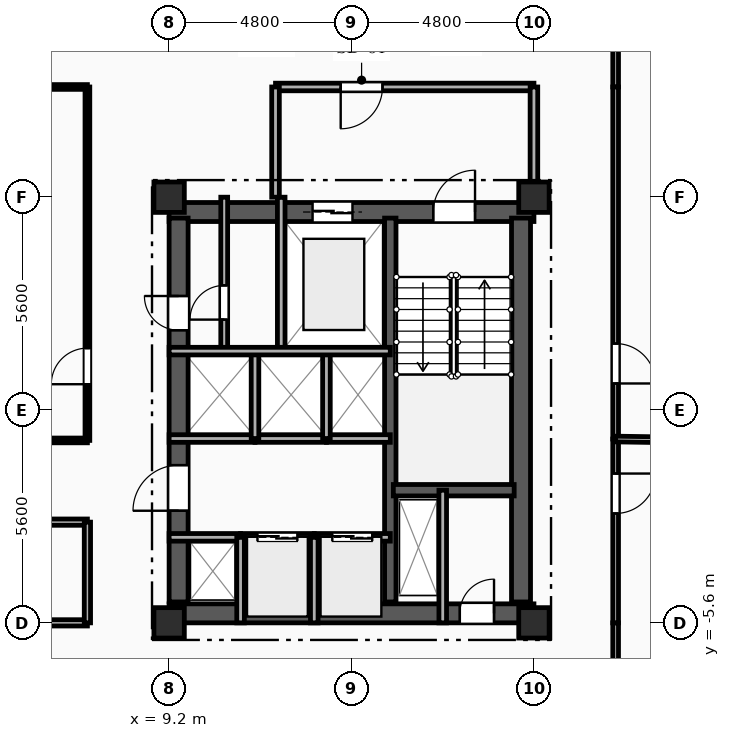
"""IFC4 building model, lengths in metres.
Left out: names, types, materials, properties, quantities, classifications, styles, units other than length and angle.
Written with IfcOpenShell. Run it as: python <this file> out.ifc"""

import sys

from ifc_helpers import new_model, si_unit, direction, frame, frame_2d, origin, origin_2d, place, context, subcontext, project, spatial, rectangle, extrude, element, fill, save


model = new_model("IFC4")
c1 = context("Model", 3, precision=1e-05, world=origin(), true_north=direction((0.0, 1.0)))
c2 = subcontext(c1, "Body", "Model", "MODEL_VIEW")
j1 = project(units=[si_unit("LENGTHUNIT", "METRE"), si_unit("PLANEANGLEUNIT", "RADIAN")], contexts=[c1])
p1 = place(None, origin())
s1 = spatial("IfcSite", under=j1, at=p1, CompositionType="ELEMENT")
p2 = place(p1, origin())
s2 = spatial("IfcBuilding", under=s1, at=p2, CompositionType="ELEMENT")
p3 = place(p2, frame((0.0, 0.0, 179.65)))
s3 = spatial("IfcBuildingStorey", under=s2, at=p3, CompositionType="ELEMENT", Elevation=179.65)
for number, where, z_axis, x_axis in (
    (1, (9.2, -5.6, 0.0), (0.0, 0.0, 1.0), (1.0, 0.0, 0.0)),
    (2, (9.2, 5.6, 0.0), (0.0, 0.0, 1.0), (1.0, 0.0, 0.0)),
    (3, (18.8, -5.6, 0.0), (0.0, 0.0, 1.0), (1.0, 0.0, 0.0)),
    (4, (18.8, 5.6, 0.0), (0.0, 0.0, 1.0), (1.0, 0.0, 0.0)),
):
    element("IfcColumn", number, at=place(p3, frame(where, z_axis=z_axis, x_axis=x_axis)), inside=s3, PredefinedType="COLUMN", context=c2, shape_type="SweptSolid", body=[
        extrude(rectangle(XDim=0.8, YDim=0.8, at=origin_2d()), origin(), (0.0, 0.0, 1.0), 3.35),
    ])
p4 = place(p3, frame((9.2, 5.21, 0.0), z_axis=(0.0, 0.0, 1.0), x_axis=(1.0, 0.0, 0.0)))
e5 = element("IfcWall", 5, at=p4, inside=s3, PredefinedType="SHEAR", context=c2, shape_type="SweptSolid", body=[
    extrude(rectangle(XDim=9.6, YDim=0.5, at=frame_2d((4.8, 0.0))), origin(), (0.0, 0.0, 1.0), 3.04),
])
p5 = place(p4, frame((6.95, 0.0, 0.0)))
e6 = element("IfcOpeningElement", 6, at=p5, cuts=e5, PredefinedType="OPENING", context=c2, shape_type="SweptSolid", body=[
    extrude(rectangle(XDim=1.1, YDim=2.15, at=frame_2d((0.55, 1.075))), frame((0.0, 0.26, 0.0), z_axis=(0.0, -1.0, 0.0), x_axis=(1.0, 0.0, 0.0)), (0.0, 0.0, 1.0), 0.52),
])
p6 = place(p4, frame((3.775, 0.0, 0.0)))
e7 = element("IfcOpeningElement", 7, at=p6, cuts=e5, PredefinedType="OPENING", context=c2, shape_type="SweptSolid", body=[
    extrude(rectangle(XDim=1.05, YDim=2.1, at=frame_2d((0.525, 1.05))), frame((0.0, 0.26, 0.0), z_axis=(0.0, -1.0, 0.0), x_axis=(1.0, 0.0, 0.0)), (0.0, 0.0, 1.0), 0.52),
])
p7 = place(p3, frame((9.2, -5.35, 0.0), z_axis=(0.0, 0.0, 1.0), x_axis=(1.0, 0.0, 0.0)))
e8 = element("IfcWall", 8, at=p7, inside=s3, PredefinedType="SHEAR", context=c2, shape_type="SweptSolid", body=[
    extrude(rectangle(XDim=9.6, YDim=0.5, at=frame_2d((4.8, 0.0))), origin(), (0.0, 0.0, 1.0), 3.04),
])
p8 = place(p7, frame((7.65, 0.0, 0.0)))
e9 = element("IfcOpeningElement", 9, at=p8, cuts=e8, PredefinedType="OPENING", context=c2, shape_type="SweptSolid", body=[
    extrude(rectangle(XDim=0.9, YDim=2.1, at=frame_2d((0.45, 1.05))), frame((0.0, 0.26, 0.0), z_axis=(0.0, -1.0, 0.0), x_axis=(1.0, 0.0, 0.0)), (0.0, 0.0, 1.0), 0.52),
])
p9 = place(p3, frame((9.45, -5.05, 0.0), z_axis=(0.0, 0.0, 1.0), x_axis=(0.0, 1.0, 0.0)))
e10 = element("IfcWall", 10, at=p9, inside=s3, PredefinedType="SHEAR", context=c2, shape_type="SweptSolid", body=[
    extrude(rectangle(XDim=10.1, YDim=0.5, at=frame_2d((5.05, 0.0))), origin(), (0.0, 0.0, 1.0), 3.04),
])
p10 = place(p9, frame((7.15, 0.0, 0.0)))
e11 = element("IfcOpeningElement", 11, at=p10, cuts=e10, PredefinedType="OPENING", context=c2, shape_type="SweptSolid", body=[
    extrude(rectangle(XDim=0.9, YDim=2.1, at=frame_2d((0.45, 1.05))), frame((0.0, 0.26, 0.0), z_axis=(0.0, -1.0, 0.0), x_axis=(1.0, 0.0, 0.0)), (0.0, 0.0, 1.0), 0.52),
])
p11 = place(p9, frame((2.4, 0.0, 0.0)))
e12 = element("IfcOpeningElement", 12, at=p11, cuts=e10, PredefinedType="OPENING", context=c2, shape_type="SweptSolid", body=[
    extrude(rectangle(XDim=1.2, YDim=2.15, at=frame_2d((0.6, 1.075))), frame((0.0, 0.26, 0.0), z_axis=(0.0, -1.0, 0.0), x_axis=(1.0, 0.0, 0.0)), (0.0, 0.0, 1.0), 0.52),
])
p12 = place(p3, frame((18.46, -5.05, 0.0), z_axis=(0.0, 0.0, 1.0), x_axis=(0.0, 1.0, 0.0)))
e13 = element("IfcWall", 13, at=p12, inside=s3, PredefinedType="SHEAR", context=c2, shape_type="SweptSolid", body=[
    extrude(rectangle(XDim=10.1, YDim=0.5, at=frame_2d((5.05, 0.0))), origin(), (0.0, 0.0, 1.0), 3.04),
])
p13 = place(p3, frame((15.02, -5.05, 0.0), z_axis=(0.0, 0.0, 1.0), x_axis=(0.0, 1.0, 0.0)))
e14 = element("IfcWall", 14, at=p13, inside=s3, PredefinedType="SHEAR", context=c2, shape_type="SweptSolid", body=[
    extrude(rectangle(XDim=10.1, YDim=0.3, at=frame_2d((5.05, 0.0))), origin(), (0.0, 0.0, 1.0), 3.04),
])
p14 = place(p3, frame((15.1, -2.11, 0.0), z_axis=(0.0, 0.0, 1.0), x_axis=(1.0, 0.0, 0.0)))
e15 = element("IfcWall", 15, at=p14, inside=s3, PredefinedType="SHEAR", context=c2, shape_type="SweptSolid", body=[
    extrude(rectangle(XDim=3.18, YDim=0.3, at=frame_2d((1.59, 0.0))), origin(), (0.0, 0.0, 1.0), 3.04),
])
p15 = place(p3, frame((16.4, -2.11, 0.0), z_axis=(0.0, 0.0, 1.0), x_axis=(0.0, -1.0, 0.0)))
e16 = element("IfcWall", 16, at=p15, inside=s3, PredefinedType="PARTITIONING", context=c2, shape_type="SweptSolid", body=[
    extrude(rectangle(XDim=3.49, YDim=0.2, at=frame_2d((1.745, 0.0))), origin(), (0.0, 0.0, 1.0), 3.04),
])
p16 = place(p3, frame((12.15, 5.6, 0.0), z_axis=(0.0, 0.0, 1.0), x_axis=(0.0, -1.0, 0.0)))
e17 = element("IfcWall", 17, at=p16, inside=s3, PredefinedType="PARTITIONING", context=c2, shape_type="SweptSolid", body=[
    extrude(rectangle(XDim=4.05, YDim=0.2, at=frame_2d((2.025, 0.0))), origin(), (0.0, 0.0, 1.0), 3.04),
])
p17 = place(p3, frame((18.8, 8.5, 0.0), z_axis=(0.0, 0.0, 1.0), x_axis=(-1.0, 0.0, 0.0)))
e18 = element("IfcWall", 18, at=p17, inside=s3, PredefinedType="PARTITIONING", context=c2, shape_type="SweptSolid", body=[
    extrude(rectangle(XDim=6.8, YDim=0.2, at=frame_2d((3.4, 0.0))), origin(), (0.0, 0.0, 1.0), 3.04),
])
p18 = place(p17, frame((3.985, 0.0, 0.0)))
e19 = element("IfcOpeningElement", 19, at=p18, cuts=e18, PredefinedType="OPENING", context=c2, shape_type="SweptSolid", body=[
    extrude(rectangle(XDim=1.1, YDim=2.15, at=frame_2d((0.55, 1.075))), frame((0.0, 0.11, 0.0), z_axis=(0.0, -1.0, 0.0), x_axis=(1.0, 0.0, 0.0)), (0.0, 0.0, 1.0), 0.22),
])
p19 = place(p3, frame((18.8, 5.6, 0.0), z_axis=(0.0, 0.0, 1.0), x_axis=(0.0, 1.0, 0.0)))
e20 = element("IfcWall", 20, at=p19, inside=s3, PredefinedType="PARTITIONING", context=c2, shape_type="SweptSolid", body=[
    extrude(rectangle(XDim=2.9, YDim=0.2, at=frame_2d((1.45, 0.0))), origin(), (0.0, 0.0, 1.0), 2.665),
])
p20 = place(p3, frame((12.0, 8.5, 0.0), z_axis=(0.0, 0.0, 1.0), x_axis=(0.0, -1.0, 0.0)))
e21 = element("IfcWall", 21, at=p20, inside=s3, PredefinedType="PARTITIONING", context=c2, shape_type="SweptSolid", body=[
    extrude(rectangle(XDim=2.9, YDim=0.2, at=frame_2d((1.45, 0.0))), origin(), (0.0, 0.0, 1.0), 3.04),
])
p21 = place(p3, frame((10.65, 1.55, 0.0), z_axis=(0.0, 0.0, 1.0), x_axis=(0.0, 1.0, 0.0)))
e22 = element("IfcWall", 22, at=p21, inside=s3, PredefinedType="PARTITIONING", context=c2, shape_type="SweptSolid", body=[
    extrude(rectangle(XDim=4.05, YDim=0.18, at=frame_2d((2.025, 0.0))), origin(), (0.0, 0.0, 1.0), 3.04),
])
p22 = place(p21, frame((0.829, 0.0, 0.0)))
e23 = element("IfcOpeningElement", 23, at=p22, cuts=e22, PredefinedType="OPENING", context=c2, shape_type="SweptSolid", body=[
    extrude(rectangle(XDim=0.9, YDim=2.1, at=frame_2d((0.45, 1.05))), frame((0.0, 0.1, 0.0), z_axis=(0.0, -1.0, 0.0), x_axis=(1.0, 0.0, 0.0)), (0.0, 0.0, 1.0), 0.2),
])
p23 = place(p3, frame((9.2, -3.35, 0.0), z_axis=(0.0, 0.0, 1.0), x_axis=(1.0, 0.0, 0.0)))
e24 = element("IfcWall", 24, at=p23, inside=s3, PredefinedType="PARTITIONING", context=c2, shape_type="SweptSolid", body=[
    extrude(rectangle(XDim=1.88, YDim=0.2, at=frame_2d((0.94, 0.0))), origin(), (0.0, 0.0, 1.0), 2.755),
])
p24 = place(p3, frame((11.08, -3.35, 0.0), z_axis=(0.0, 0.0, 1.0), x_axis=(1.0, 0.0, 0.0)))
e25 = element("IfcWall", 25, at=p24, inside=s3, PredefinedType="PARTITIONING", context=c2, shape_type="SweptSolid", body=[
    extrude(rectangle(XDim=1.94, YDim=0.2, at=frame_2d((0.97, 0.0))), origin(), (0.0, 0.0, 1.0), 3.04),
])
p25 = place(p24, frame((0.445, 0.0, 0.0)))
e26 = element("IfcOpeningElement", 26, at=p25, cuts=e25, PredefinedType="OPENING", context=c2, shape_type="SweptSolid", body=[
    extrude(rectangle(XDim=1.05, YDim=2.1, at=frame_2d((0.525, 1.05))), frame((0.0, 0.11, 0.0), z_axis=(0.0, -1.0, 0.0), x_axis=(1.0, 0.0, 0.0)), (0.0, 0.0, 1.0), 0.22),
])
p26 = place(p3, frame((13.02, -3.35, 0.0), z_axis=(0.0, 0.0, 1.0), x_axis=(1.0, 0.0, 0.0)))
e27 = element("IfcWall", 27, at=p26, inside=s3, PredefinedType="PARTITIONING", context=c2, shape_type="SweptSolid", body=[
    extrude(rectangle(XDim=2.0, YDim=0.2, at=frame_2d((1.0, 0.0))), origin(), (0.0, 0.0, 1.0), 3.04),
])
p27 = place(p26, frame((0.475, 0.0, 0.0)))
e28 = element("IfcOpeningElement", 28, at=p27, cuts=e27, PredefinedType="OPENING", context=c2, shape_type="SweptSolid", body=[
    extrude(rectangle(XDim=1.05, YDim=2.1, at=frame_2d((0.525, 1.05))), frame((0.0, 0.11, 0.0), z_axis=(0.0, -1.0, 0.0), x_axis=(1.0, 0.0, 0.0)), (0.0, 0.0, 1.0), 0.22),
])
p28 = place(p3, frame((11.46, -0.75, 0.0), z_axis=(0.0, 0.0, 1.0), x_axis=(-1.0, 0.0, 0.0)))
e29 = element("IfcWall", 29, at=p28, inside=s3, PredefinedType="PARTITIONING", context=c2, shape_type="SweptSolid", body=[
    extrude(rectangle(XDim=2.26, YDim=0.2, at=frame_2d((1.13, 0.0))), origin(), (0.0, 0.0, 1.0), 3.04),
])
p29 = place(p3, frame((13.34, -0.75, 0.0), z_axis=(0.0, 0.0, 1.0), x_axis=(-1.0, 0.0, 0.0)))
e30 = element("IfcWall", 30, at=p29, inside=s3, PredefinedType="PARTITIONING", context=c2, shape_type="SweptSolid", body=[
    extrude(rectangle(XDim=1.88, YDim=0.2, at=frame_2d((0.94, 0.0))), origin(), (0.0, 0.0, 1.0), 3.04),
])
p30 = place(p3, frame((15.02, -0.75, 0.0), z_axis=(0.0, 0.0, 1.0), x_axis=(-1.0, 0.0, 0.0)))
e31 = element("IfcWall", 31, at=p30, inside=s3, PredefinedType="PARTITIONING", context=c2, shape_type="SweptSolid", body=[
    extrude(rectangle(XDim=1.68, YDim=0.2, at=frame_2d((0.84, 0.0))), origin(), (0.0, 0.0, 1.0), 3.04),
])
for number, where, z_axis, x_axis in (
    (32, (11.08, -5.6, 0.0), (0.0, 0.0, 1.0), (0.0, 1.0, 0.0)),
    (33, (13.02, -5.6, 0.0), (0.0, 0.0, 1.0), (0.0, 1.0, 0.0)),
):
    element("IfcWall", number, at=place(p3, frame(where, z_axis=z_axis, x_axis=x_axis)), inside=s3, PredefinedType="PARTITIONING", context=c2, shape_type="SweptSolid", body=[
        extrude(rectangle(XDim=2.25, YDim=0.2, at=frame_2d((1.125, 0.0))), origin(), (0.0, 0.0, 1.0), 3.04),
    ])
for number, where, z_axis, x_axis in (
    (34, (11.46, -0.75, 0.0), (0.0, 0.0, 1.0), (0.0, 1.0, 0.0)),
    (35, (13.34, -0.75, 0.0), (0.0, 0.0, 1.0), (0.0, 1.0, 0.0)),
):
    element("IfcWall", number, at=place(p3, frame(where, z_axis=z_axis, x_axis=x_axis)), inside=s3, PredefinedType="PARTITIONING", context=c2, shape_type="SweptSolid", body=[
        extrude(rectangle(XDim=2.3, YDim=0.2, at=frame_2d((1.15, 0.0))), origin(), (0.0, 0.0, 1.0), 3.04),
    ])
p31 = place(p3, frame((20.95, 10.65, 0.0), z_axis=(0.0, 0.0, 1.0), x_axis=(0.0, -1.0, 0.0)))
e36 = element("IfcWall", 36, at=p31, inside=s3, PredefinedType="PARTITIONING", context=c2, shape_type="SweptSolid", body=[
    extrude(rectangle(XDim=2.15, YDim=0.15, at=frame_2d((1.075, 0.0))), origin(), (0.0, 0.0, 1.0), 3.04),
])
p32 = place(p3, frame((7.05, 8.5, 0.0), z_axis=(0.0, 0.0, 1.0), x_axis=(-1.0, 0.0, 0.0)))
e37 = element("IfcWall", 37, at=p32, inside=s3, PredefinedType="PARTITIONING", context=c2, shape_type="SweptSolid", body=[
    extrude(rectangle(XDim=7.05, YDim=0.125, at=frame_2d((3.525, 0.0))), origin(), (0.0, 0.0, 1.0), 3.04),
])
p33 = place(p3, frame((20.95, -5.6, 0.0), z_axis=(0.0, 0.0, 1.0), x_axis=(0.0, -1.0, 0.0)))
e38 = element("IfcWall", 38, at=p33, inside=s3, PredefinedType="PARTITIONING", context=c2, shape_type="SweptSolid", body=[
    extrude(rectangle(XDim=2.15, YDim=0.15, at=frame_2d((1.075, 0.0))), origin(), (0.0, 0.0, 1.0), 3.04),
])
p34 = place(p3, frame((0.0, -5.6, 0.0), z_axis=(0.0, 0.0, 1.0), x_axis=(1.0, 0.0, 0.0)))
e39 = element("IfcWall", 39, at=p34, inside=s3, PredefinedType="PARTITIONING", context=c2, shape_type="SweptSolid", body=[
    extrude(rectangle(XDim=7.05, YDim=0.165, at=frame_2d((3.525, 0.0))), origin(), (0.0, 0.0, 1.0), 2.525),
])
p35 = place(p3, frame((20.95, -0.763, 0.0), z_axis=(0.0, 0.0, 1.0), x_axis=(0.0, -1.0, 0.0)))
e40 = element("IfcWall", 40, at=p35, inside=s3, PredefinedType="PARTITIONING", context=c2, shape_type="SweptSolid", body=[
    extrude(rectangle(XDim=4.837, YDim=0.15, at=frame_2d((2.418, 0.0))), origin(), (0.0, 0.0, 1.0), 2.695),
])
p36 = place(p35, frame((0.908, 0.0, 0.0)))
e41 = element("IfcOpeningElement", 41, at=p36, cuts=e40, PredefinedType="OPENING", context=c2, shape_type="SweptSolid", body=[
    extrude(rectangle(XDim=1.05, YDim=2.15, at=frame_2d((0.525, 1.075))), frame((0.0, 0.085, 0.0), z_axis=(0.0, -1.0, 0.0), x_axis=(1.0, 0.0, 0.0)), (0.0, 0.0, 1.0), 0.17),
])
p37 = place(p3, frame((20.95, 8.5, 0.0), z_axis=(0.0, 0.0, 1.0), x_axis=(0.0, -1.0, 0.0)))
e42 = element("IfcWall", 42, at=p37, inside=s3, PredefinedType="PARTITIONING", context=c2, shape_type="SweptSolid", body=[
    extrude(rectangle(XDim=9.263, YDim=0.15, at=frame_2d((4.632, 0.0))), origin(), (0.0, 0.0, 1.0), 2.695),
])
p38 = place(p37, frame((6.751, 0.0, 0.0)))
e43 = element("IfcOpeningElement", 43, at=p38, cuts=e42, PredefinedType="OPENING", context=c2, shape_type="SweptSolid", body=[
    extrude(rectangle(XDim=1.05, YDim=2.15, at=frame_2d((0.525, 1.075))), frame((0.0, 0.085, 0.0), z_axis=(0.0, -1.0, 0.0), x_axis=(1.0, 0.0, 0.0)), (0.0, 0.0, 1.0), 0.17),
])
p39 = place(p3, frame((0.0, -0.8, 0.0), z_axis=(0.0, 0.0, 1.0), x_axis=(1.0, 0.0, 0.0)))
e44 = element("IfcWall", 44, at=p39, inside=s3, PredefinedType="PARTITIONING", context=c2, shape_type="SweptSolid", body=[
    extrude(rectangle(XDim=7.05, YDim=0.125, at=frame_2d((3.525, 0.0))), origin(), (0.0, 0.0, 1.0), 3.04),
])
p40 = place(p3, frame((7.05, -2.95, 0.0), z_axis=(0.0, 0.0, 1.0), x_axis=(-1.0, 0.0, 0.0)))
e45 = element("IfcWall", 45, at=p40, inside=s3, PredefinedType="PARTITIONING", context=c2, shape_type="SweptSolid", body=[
    extrude(rectangle(XDim=14.1, YDim=0.165, at=frame_2d((7.05, 0.0))), origin(), (0.0, 0.0, 1.0), 3.04),
])
p41 = place(p40, frame((6.475, 0.0, 0.0)))
e46 = element("IfcOpeningElement", 46, at=p41, cuts=e45, PredefinedType="OPENING", context=c2, shape_type="SweptSolid", body=[
    extrude(rectangle(XDim=1.15, YDim=2.15, at=frame_2d((0.575, 1.075))), frame((0.0, 0.093, 0.0), z_axis=(0.0, -1.0, 0.0), x_axis=(1.0, 0.0, 0.0)), (0.0, 0.0, 1.0), 0.185),
])
p42 = place(p3, frame((7.05, -0.8, 0.0), z_axis=(0.0, 0.0, 1.0), x_axis=(0.0, 1.0, 0.0)))
e47 = element("IfcWall", 47, at=p42, inside=s3, PredefinedType="PARTITIONING", context=c2, shape_type="SweptSolid", body=[
    extrude(rectangle(XDim=9.3, YDim=0.125, at=frame_2d((4.65, 0.0))), origin(), (0.0, 0.0, 1.0), 3.04),
])
p43 = place(p42, frame((1.479, 0.0, 0.0)))
e48 = element("IfcOpeningElement", 48, at=p43, cuts=e47, PredefinedType="OPENING", context=c2, shape_type="SweptSolid", body=[
    extrude(rectangle(XDim=0.95, YDim=2.1, at=frame_2d((0.475, 1.05))), frame((0.0, 0.073, 0.0), z_axis=(0.0, -1.0, 0.0), x_axis=(1.0, 0.0, 0.0)), (0.0, 0.0, 1.0), 0.145),
])
p44 = place(p3, frame((7.05, -5.6, 0.0), z_axis=(0.0, 0.0, 1.0), x_axis=(0.0, 1.0, 0.0)))
e49 = element("IfcWall", 49, at=p44, inside=s3, PredefinedType="PARTITIONING", context=c2, shape_type="SweptSolid", body=[
    extrude(rectangle(XDim=2.65, YDim=0.165, at=frame_2d((1.325, 0.0))), origin(), (0.0, 0.0, 1.0), 3.04),
])
p45 = place(p3, frame((20.95, -0.763, 0.0), z_axis=(0.0, 0.0, 1.0), x_axis=(0.999875696831, -0.015766765259, 0.0)))
e50 = element("IfcWall", 50, at=p45, inside=s3, PredefinedType="PARTITIONING", context=c2, shape_type="SweptSolid", body=[
    extrude(rectangle(XDim=2.787, YDim=0.15, at=frame_2d((1.394, 0.0))), origin(), (0.0, 0.0, 1.0), 3.04),
])
p46 = place(p3, frame((9.2, 1.55, 0.0), z_axis=(0.0, 0.0, 1.0), x_axis=(1.0, 0.0, 0.0)))
e51 = element("IfcWall", 51, at=p46, inside=s3, PredefinedType="PARTITIONING", context=c2, shape_type="SweptSolid", body=[
    extrude(rectangle(XDim=5.82, YDim=0.2, at=frame_2d((2.91, 0.0))), origin(), (0.0, 0.0, 1.0), 3.04),
])
p47 = place(p5, origin())
e52 = element("IfcDoor", 52, at=p47, inside=s3, OperationType="SINGLE_SWING_RIGHT", PredefinedType="DOOR", context=c2, shape_type="SweptSolid", body=[
    extrude(rectangle(XDim=1.1, YDim=2.15, at=frame_2d((0.55, 1.075))), frame((0.0, 0.025, 0.0), z_axis=(0.0, -1.0, 0.0), x_axis=(1.0, 0.0, 0.0)), (0.0, 0.0, 1.0), 0.05),
])
fill(e6, e52)
p48 = place(p6, origin())
e53 = element("IfcDoor", 53, at=p48, inside=s3, OperationType="DOUBLE_DOOR_SLIDING", PredefinedType="DOOR", context=c2, shape_type="SweptSolid", body=[
    extrude(rectangle(XDim=1.05, YDim=2.1, at=frame_2d((0.525, 1.05))), frame((0.0, 0.025, 0.0), z_axis=(0.0, -1.0, 0.0), x_axis=(1.0, 0.0, 0.0)), (0.0, 0.0, 1.0), 0.05),
])
fill(e7, e53)
p49 = place(p8, origin())
e54 = element("IfcDoor", 54, at=p49, inside=s3, OperationType="SINGLE_SWING_RIGHT", PredefinedType="DOOR", context=c2, shape_type="SweptSolid", body=[
    extrude(rectangle(XDim=0.9, YDim=2.1, at=frame_2d((0.45, 1.05))), frame((0.0, 0.025, 0.0), z_axis=(0.0, -1.0, 0.0), x_axis=(1.0, 0.0, 0.0)), (0.0, 0.0, 1.0), 0.05),
])
fill(e9, e54)
p50 = place(p18, origin())
e55 = element("IfcDoor", 55, at=p50, inside=s3, OperationType="SINGLE_SWING_RIGHT", PredefinedType="DOOR", context=c2, shape_type="SweptSolid", body=[
    extrude(rectangle(XDim=1.1, YDim=2.15, at=frame_2d((0.55, 1.075))), frame((0.0, 0.025, 0.0), z_axis=(0.0, -1.0, 0.0), x_axis=(1.0, 0.0, 0.0)), (0.0, 0.0, 1.0), 0.05),
])
fill(e19, e55)
p51 = place(p22, origin())
e56 = element("IfcDoor", 56, at=p51, inside=s3, OperationType="SINGLE_SWING_LEFT", PredefinedType="DOOR", context=c2, shape_type="SweptSolid", body=[
    extrude(rectangle(XDim=0.9, YDim=2.1, at=frame_2d((0.45, 1.05))), frame((0.0, 0.025, 0.0), z_axis=(0.0, -1.0, 0.0), x_axis=(1.0, 0.0, 0.0)), (0.0, 0.0, 1.0), 0.05),
])
fill(e23, e56)
p52 = place(p10, origin())
e57 = element("IfcDoor", 57, at=p52, inside=s3, OperationType="SINGLE_SWING_RIGHT", PredefinedType="DOOR", context=c2, shape_type="SweptSolid", body=[
    extrude(rectangle(XDim=0.9, YDim=2.1, at=frame_2d((0.45, 1.05))), frame((0.0, 0.025, 0.0), z_axis=(0.0, -1.0, 0.0), x_axis=(1.0, 0.0, 0.0)), (0.0, 0.0, 1.0), 0.05),
])
fill(e11, e57)
p53 = place(p25, origin())
e58 = element("IfcDoor", 58, at=p53, inside=s3, OperationType="DOUBLE_DOOR_SLIDING", PredefinedType="DOOR", context=c2, shape_type="SweptSolid", body=[
    extrude(rectangle(XDim=1.05, YDim=2.1, at=frame_2d((0.525, 1.05))), frame((0.0, 0.025, 0.0), z_axis=(0.0, -1.0, 0.0), x_axis=(1.0, 0.0, 0.0)), (0.0, 0.0, 1.0), 0.05),
])
fill(e26, e58)
p54 = place(p27, origin())
e59 = element("IfcDoor", 59, at=p54, inside=s3, OperationType="DOUBLE_DOOR_SLIDING", PredefinedType="DOOR", context=c2, shape_type="SweptSolid", body=[
    extrude(rectangle(XDim=1.05, YDim=2.1, at=frame_2d((0.525, 1.05))), frame((0.0, 0.025, 0.0), z_axis=(0.0, -1.0, 0.0), x_axis=(1.0, 0.0, 0.0)), (0.0, 0.0, 1.0), 0.05),
])
fill(e28, e59)
p55 = place(p11, origin())
e60 = element("IfcDoor", 60, at=p55, inside=s3, OperationType="SINGLE_SWING_LEFT", PredefinedType="DOOR", context=c2, shape_type="SweptSolid", body=[
    extrude(rectangle(XDim=1.2, YDim=2.15, at=frame_2d((0.6, 1.075))), frame((0.0, 0.025, 0.0), z_axis=(0.0, -1.0, 0.0), x_axis=(1.0, 0.0, 0.0)), (0.0, 0.0, 1.0), 0.05),
])
fill(e12, e60)
p56 = place(p36, origin())
e61 = element("IfcDoor", 61, at=p56, inside=s3, OperationType="SINGLE_SWING_LEFT", PredefinedType="DOOR", context=c2, shape_type="SweptSolid", body=[
    extrude(rectangle(XDim=1.05, YDim=2.15, at=frame_2d((0.525, 1.075))), frame((0.0, 0.025, 0.0), z_axis=(0.0, -1.0, 0.0), x_axis=(1.0, 0.0, 0.0)), (0.0, 0.0, 1.0), 0.05),
])
fill(e41, e61)
p57 = place(p38, origin())
e62 = element("IfcDoor", 62, at=p57, inside=s3, OperationType="SINGLE_SWING_RIGHT", PredefinedType="DOOR", context=c2, shape_type="SweptSolid", body=[
    extrude(rectangle(XDim=1.05, YDim=2.15, at=frame_2d((0.525, 1.075))), frame((0.0, 0.025, 0.0), z_axis=(0.0, -1.0, 0.0), x_axis=(1.0, 0.0, 0.0)), (0.0, 0.0, 1.0), 0.05),
])
fill(e43, e62)
p58 = place(p43, origin())
e63 = element("IfcDoor", 63, at=p58, inside=s3, OperationType="SINGLE_SWING_LEFT", PredefinedType="DOOR", context=c2, shape_type="SweptSolid", body=[
    extrude(rectangle(XDim=0.95, YDim=2.1, at=frame_2d((0.475, 1.05))), frame((0.0, 0.025, 0.0), z_axis=(0.0, -1.0, 0.0), x_axis=(1.0, 0.0, 0.0)), (0.0, 0.0, 1.0), 0.05),
])
fill(e48, e63)
save(model, sys.argv[1])
